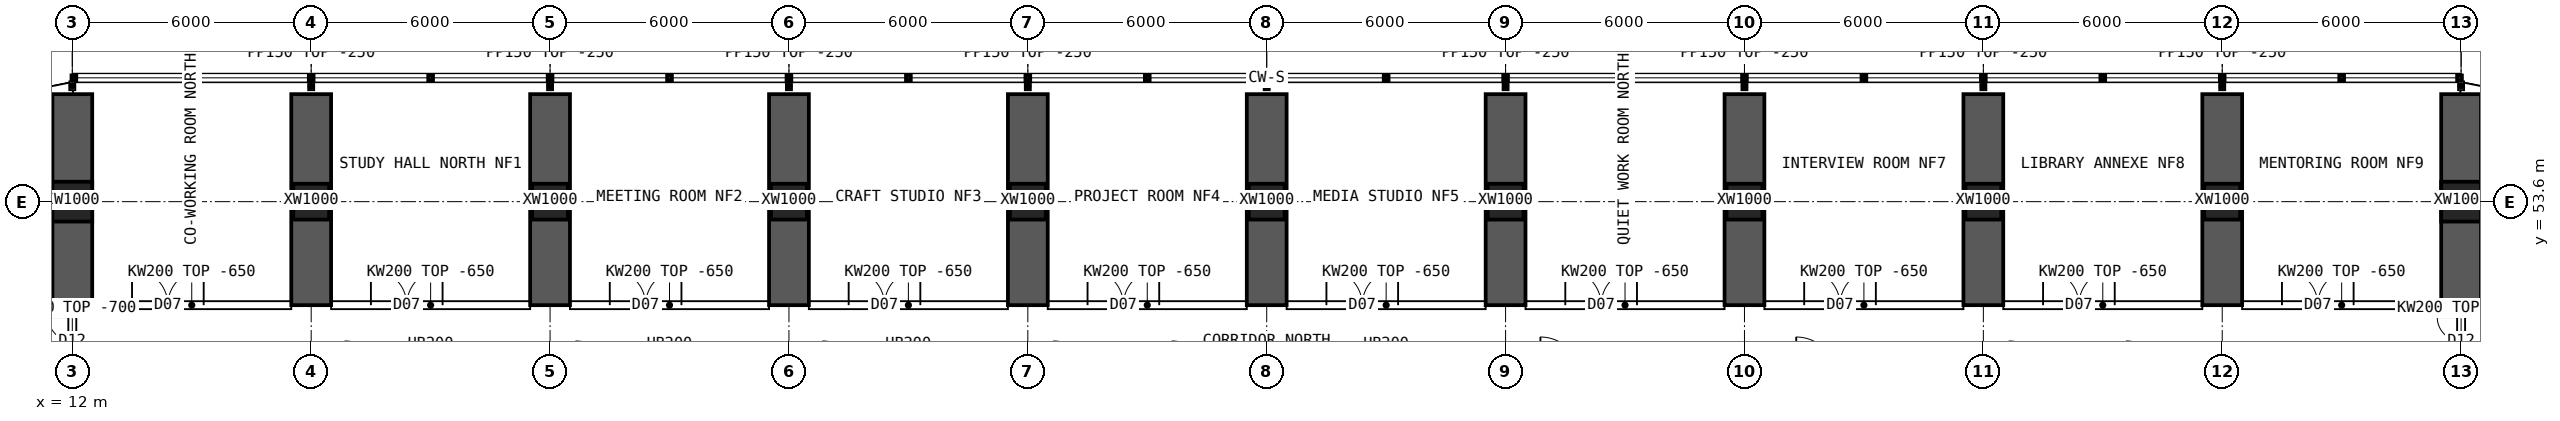
"""IFC4 building model, lengths in metres.
Left out: names, types, materials, properties, quantities, classifications, styles, units other than length and angle.
Written with IfcOpenShell. Run it as: python <this file> out.ifc"""

import sys

from ifc_helpers import new_model, si_unit, direction, frame, frame_2d, origin, origin_2d, place, context, subcontext, project, spatial, polyline, rectangle, hollow_rectangle, outline, extrude, element, fill, save


model = new_model("IFC4")
c1 = context("Model", 3, precision=1e-05, world=origin(), true_north=direction((0.0, 1.0)))
c2 = subcontext(c1, "Body", "Model", "MODEL_VIEW")
j1 = project(units=[si_unit("LENGTHUNIT", "METRE"), si_unit("PLANEANGLEUNIT", "RADIAN")], contexts=[c1])
p1 = place(None, origin())
s1 = spatial("IfcSite", under=j1, at=p1, CompositionType="ELEMENT")
p2 = place(p1, origin())
s2 = spatial("IfcBuilding", under=s1, at=p2, CompositionType="ELEMENT")
p3 = place(p2, frame((0.0, 0.0, 16.0)))
s3 = spatial("IfcBuildingStorey", under=s2, at=p3, CompositionType="ELEMENT", Elevation=16.0)
p4 = place(p3, frame((12.0, 53.6, 0.0), z_axis=(0.0, 0.0, 1.0), x_axis=(1.0, 0.0, 0.0)))
e1 = element("IfcColumn", 1, at=p4, inside=s3, PredefinedType="COLUMN", context=c2, shape_type="SweptSolid", body=[
    extrude(hollow_rectangle(XDim=1.0, YDim=1.0, WallThickness=0.1, at=origin_2d()), origin(), (0.0, 0.0, 1.0), 4.2),
])
for number, where, z_axis, x_axis in (
    (2, (18.0, 53.6, 0.0), (0.0, 0.0, 1.0), (1.0, 0.0, 0.0)),
    (3, (24.0, 53.6, 0.0), (0.0, 0.0, 1.0), (1.0, 0.0, 0.0)),
    (4, (30.0, 53.6, 0.0), (0.0, 0.0, 1.0), (1.0, 0.0, 0.0)),
    (5, (36.0, 53.6, 0.0), (0.0, 0.0, 1.0), (1.0, 0.0, 0.0)),
    (6, (42.0, 53.6, 0.0), (0.0, 0.0, 1.0), (1.0, 0.0, 0.0)),
    (7, (48.0, 53.6, 0.0), (0.0, 0.0, 1.0), (1.0, 0.0, 0.0)),
    (8, (54.0, 53.6, 0.0), (0.0, 0.0, 1.0), (1.0, 0.0, 0.0)),
    (9, (60.0, 53.6, 0.0), (0.0, 0.0, 1.0), (1.0, 0.0, 0.0)),
    (10, (66.0, 53.6, 0.0), (0.0, 0.0, 1.0), (1.0, 0.0, 0.0)),
):
    element("IfcColumn", number, at=place(p3, frame(where, z_axis=z_axis, x_axis=x_axis)), inside=s3, PredefinedType="COLUMN", context=c2, shape_type="SweptSolid", body=[
        extrude(hollow_rectangle(XDim=0.9, YDim=0.9, WallThickness=0.09, at=origin_2d()), origin(), (0.0, 0.0, 1.0), 4.2),
    ])
p5 = place(p3, frame((72.0, 53.6, 0.0), z_axis=(0.0, 0.0, 1.0), x_axis=(1.0, 0.0, 0.0)))
e11 = element("IfcColumn", 11, at=p5, inside=s3, PredefinedType="COLUMN", context=c2, shape_type="SweptSolid", body=[
    extrude(hollow_rectangle(XDim=1.0, YDim=1.0, WallThickness=0.1, at=origin_2d()), origin(), (0.0, 0.0, 1.0), 4.2),
])
for number, where, z_axis, x_axis in (
    (12, (12.0, 51.0, 0.0), (0.0, 0.0, 1.0), (0.0, 1.0, 0.0)),
    (13, (18.0, 51.0, 0.0), (0.0, 0.0, 1.0), (0.0, 1.0, 0.0)),
    (14, (24.0, 51.0, 0.0), (0.0, 0.0, 1.0), (0.0, 1.0, 0.0)),
    (15, (30.0, 51.0, 0.0), (0.0, 0.0, 1.0), (0.0, 1.0, 0.0)),
    (16, (36.0, 51.0, 0.0), (0.0, 0.0, 1.0), (0.0, 1.0, 0.0)),
    (17, (42.0, 51.0, 0.0), (0.0, 0.0, 1.0), (0.0, 1.0, 0.0)),
    (18, (48.0, 51.0, 0.0), (0.0, 0.0, 1.0), (0.0, 1.0, 0.0)),
    (19, (54.0, 51.0, 0.0), (0.0, 0.0, 1.0), (0.0, 1.0, 0.0)),
    (20, (60.0, 51.0, 0.0), (0.0, 0.0, 1.0), (0.0, 1.0, 0.0)),
    (21, (66.0, 51.0, 0.0), (0.0, 0.0, 1.0), (0.0, 1.0, 0.0)),
    (22, (72.0, 51.0, 0.0), (0.0, 0.0, 1.0), (0.0, 1.0, 0.0)),
):
    element("IfcWall", number, at=place(p3, frame(where, z_axis=z_axis, x_axis=x_axis)), inside=s3, PredefinedType="SHEAR", context=c2, shape_type="SweptSolid", body=[
        extrude(rectangle(XDim=5.3, YDim=1.0, at=frame_2d((2.65, 0.0))), origin(), (0.0, 0.0, 1.0), 4.2),
    ])
p6 = place(p3, frame((75.157, 55.822, 0.0), z_axis=(0.0, 0.0, 1.0), x_axis=(-0.980787251524, 0.195080412259, 0.0)))
e23 = element("IfcWall", 23, at=p6, inside=s3, PredefinedType="SOLIDWALL", context=c2, shape_type="SweptSolid", body=[
    extrude(outline(polyline([(-0.03, -0.15), (3.249, -0.15), (3.189, 0.15), (0.03, 0.15), (-0.03, -0.15)])), origin(), (0.0, 0.0, 1.0), 3.95),
])
p7 = place(p6, frame((0.909, 0.0, 0.9)))
e24 = element("IfcOpeningElement", 24, at=p7, cuts=e23, PredefinedType="OPENING", context=c2, shape_type="SweptSolid", body=[
    extrude(rectangle(XDim=1.4, YDim=1.8, at=frame_2d((0.7, 0.9))), frame((0.0, 0.16, 0.0), z_axis=(0.0, -1.0, 0.0), x_axis=(1.0, 0.0, 0.0)), (0.0, 0.0, 1.0), 0.32),
])
p8 = place(p3, frame((12.0, 56.45, 0.0), z_axis=(0.0, 0.0, 1.0), x_axis=(-0.980787251524, -0.195080412259, 0.0)))
e25 = element("IfcWall", 25, at=p8, inside=s3, PredefinedType="SOLIDWALL", context=c2, shape_type="SweptSolid", body=[
    extrude(outline(polyline([(-0.03, -0.15), (3.249, -0.15), (3.189, 0.15), (0.03, 0.15), (-0.03, -0.15)])), origin(), (0.0, 0.0, 1.0), 3.95),
])
p9 = place(p8, frame((0.909, 0.0, 0.9)))
e26 = element("IfcOpeningElement", 26, at=p9, cuts=e25, PredefinedType="OPENING", context=c2, shape_type="SweptSolid", body=[
    extrude(rectangle(XDim=1.4, YDim=1.8, at=frame_2d((0.7, 0.9))), frame((0.0, 0.16, 0.0), z_axis=(0.0, -1.0, 0.0), x_axis=(1.0, 0.0, 0.0)), (0.0, 0.0, 1.0), 0.32),
])
p10 = place(p3, frame((12.5, 51.0, 0.0), z_axis=(0.0, 0.0, 1.0), x_axis=(1.0, 0.0, 0.0)))
e27 = element("IfcWall", 27, at=p10, inside=s3, PredefinedType="SOLIDWALL", context=c2, shape_type="SweptSolid", body=[
    extrude(outline(polyline([(0.0, 0.0), (5.0, 0.0), (5.0, 3.55), (0.0, 3.55), (0.0, 0.0)])), frame((0.0, 0.1, 0.0), z_axis=(0.0, -1.0, 0.0), x_axis=(1.0, 0.0, 0.0)), (0.0, 0.0, 1.0), 0.2),
])
p11 = place(p10, frame((1.0, 0.0, 0.0)))
e28 = element("IfcOpeningElement", 28, at=p11, cuts=e27, PredefinedType="OPENING", context=c2, shape_type="SweptSolid", body=[
    extrude(rectangle(XDim=1.8, YDim=2.1, at=frame_2d((0.9, 1.05))), frame((0.0, 0.11, 0.0), z_axis=(0.0, -1.0, 0.0), x_axis=(1.0, 0.0, 0.0)), (0.0, 0.0, 1.0), 0.22),
])
p12 = place(p3, frame((18.5, 51.0, 0.0), z_axis=(0.0, 0.0, 1.0), x_axis=(1.0, 0.0, 0.0)))
e29 = element("IfcWall", 29, at=p12, inside=s3, PredefinedType="SOLIDWALL", context=c2, shape_type="SweptSolid", body=[
    extrude(outline(polyline([(0.0, 0.0), (5.0, 0.0), (5.0, 3.55), (0.0, 3.55), (0.0, 0.0)])), frame((0.0, 0.1, 0.0), z_axis=(0.0, -1.0, 0.0), x_axis=(1.0, 0.0, 0.0)), (0.0, 0.0, 1.0), 0.2),
])
p13 = place(p12, frame((1.0, 0.0, 0.0)))
e30 = element("IfcOpeningElement", 30, at=p13, cuts=e29, PredefinedType="OPENING", context=c2, shape_type="SweptSolid", body=[
    extrude(rectangle(XDim=1.8, YDim=2.1, at=frame_2d((0.9, 1.05))), frame((0.0, 0.11, 0.0), z_axis=(0.0, -1.0, 0.0), x_axis=(1.0, 0.0, 0.0)), (0.0, 0.0, 1.0), 0.22),
])
p14 = place(p3, frame((24.5, 51.0, 0.0), z_axis=(0.0, 0.0, 1.0), x_axis=(1.0, 0.0, 0.0)))
e31 = element("IfcWall", 31, at=p14, inside=s3, PredefinedType="SOLIDWALL", context=c2, shape_type="SweptSolid", body=[
    extrude(outline(polyline([(0.0, 0.0), (5.0, 0.0), (5.0, 3.55), (0.0, 3.55), (0.0, 0.0)])), frame((0.0, 0.1, 0.0), z_axis=(0.0, -1.0, 0.0), x_axis=(1.0, 0.0, 0.0)), (0.0, 0.0, 1.0), 0.2),
])
p15 = place(p14, frame((1.0, 0.0, 0.0)))
e32 = element("IfcOpeningElement", 32, at=p15, cuts=e31, PredefinedType="OPENING", context=c2, shape_type="SweptSolid", body=[
    extrude(rectangle(XDim=1.8, YDim=2.1, at=frame_2d((0.9, 1.05))), frame((0.0, 0.11, 0.0), z_axis=(0.0, -1.0, 0.0), x_axis=(1.0, 0.0, 0.0)), (0.0, 0.0, 1.0), 0.22),
])
p16 = place(p3, frame((30.5, 51.0, 0.0), z_axis=(0.0, 0.0, 1.0), x_axis=(1.0, 0.0, 0.0)))
e33 = element("IfcWall", 33, at=p16, inside=s3, PredefinedType="SOLIDWALL", context=c2, shape_type="SweptSolid", body=[
    extrude(outline(polyline([(0.0, 0.0), (5.0, 0.0), (5.0, 3.55), (0.0, 3.55), (0.0, 0.0)])), frame((0.0, 0.1, 0.0), z_axis=(0.0, -1.0, 0.0), x_axis=(1.0, 0.0, 0.0)), (0.0, 0.0, 1.0), 0.2),
])
p17 = place(p16, frame((1.0, 0.0, 0.0)))
e34 = element("IfcOpeningElement", 34, at=p17, cuts=e33, PredefinedType="OPENING", context=c2, shape_type="SweptSolid", body=[
    extrude(rectangle(XDim=1.8, YDim=2.1, at=frame_2d((0.9, 1.05))), frame((0.0, 0.11, 0.0), z_axis=(0.0, -1.0, 0.0), x_axis=(1.0, 0.0, 0.0)), (0.0, 0.0, 1.0), 0.22),
])
p18 = place(p3, frame((36.5, 51.0, 0.0), z_axis=(0.0, 0.0, 1.0), x_axis=(1.0, 0.0, 0.0)))
e35 = element("IfcWall", 35, at=p18, inside=s3, PredefinedType="SOLIDWALL", context=c2, shape_type="SweptSolid", body=[
    extrude(outline(polyline([(0.0, 0.0), (5.0, 0.0), (5.0, 3.55), (0.0, 3.55), (0.0, 0.0)])), frame((0.0, 0.1, 0.0), z_axis=(0.0, -1.0, 0.0), x_axis=(1.0, 0.0, 0.0)), (0.0, 0.0, 1.0), 0.2),
])
p19 = place(p18, frame((1.0, 0.0, 0.0)))
e36 = element("IfcOpeningElement", 36, at=p19, cuts=e35, PredefinedType="OPENING", context=c2, shape_type="SweptSolid", body=[
    extrude(rectangle(XDim=1.8, YDim=2.1, at=frame_2d((0.9, 1.05))), frame((0.0, 0.11, 0.0), z_axis=(0.0, -1.0, 0.0), x_axis=(1.0, 0.0, 0.0)), (0.0, 0.0, 1.0), 0.22),
])
p20 = place(p3, frame((42.5, 51.0, 0.0), z_axis=(0.0, 0.0, 1.0), x_axis=(1.0, 0.0, 0.0)))
e37 = element("IfcWall", 37, at=p20, inside=s3, PredefinedType="SOLIDWALL", context=c2, shape_type="SweptSolid", body=[
    extrude(outline(polyline([(0.0, 0.0), (5.0, 0.0), (5.0, 3.55), (0.0, 3.55), (0.0, 0.0)])), frame((0.0, 0.1, 0.0), z_axis=(0.0, -1.0, 0.0), x_axis=(1.0, 0.0, 0.0)), (0.0, 0.0, 1.0), 0.2),
])
p21 = place(p20, frame((1.0, 0.0, 0.0)))
e38 = element("IfcOpeningElement", 38, at=p21, cuts=e37, PredefinedType="OPENING", context=c2, shape_type="SweptSolid", body=[
    extrude(rectangle(XDim=1.8, YDim=2.1, at=frame_2d((0.9, 1.05))), frame((0.0, 0.11, 0.0), z_axis=(0.0, -1.0, 0.0), x_axis=(1.0, 0.0, 0.0)), (0.0, 0.0, 1.0), 0.22),
])
p22 = place(p3, frame((48.5, 51.0, 0.0), z_axis=(0.0, 0.0, 1.0), x_axis=(1.0, 0.0, 0.0)))
e39 = element("IfcWall", 39, at=p22, inside=s3, PredefinedType="SOLIDWALL", context=c2, shape_type="SweptSolid", body=[
    extrude(outline(polyline([(0.0, 0.0), (5.0, 0.0), (5.0, 3.55), (0.0, 3.55), (0.0, 0.0)])), frame((0.0, 0.1, 0.0), z_axis=(0.0, -1.0, 0.0), x_axis=(1.0, 0.0, 0.0)), (0.0, 0.0, 1.0), 0.2),
])
p23 = place(p22, frame((1.0, 0.0, 0.0)))
e40 = element("IfcOpeningElement", 40, at=p23, cuts=e39, PredefinedType="OPENING", context=c2, shape_type="SweptSolid", body=[
    extrude(rectangle(XDim=1.8, YDim=2.1, at=frame_2d((0.9, 1.05))), frame((0.0, 0.11, 0.0), z_axis=(0.0, -1.0, 0.0), x_axis=(1.0, 0.0, 0.0)), (0.0, 0.0, 1.0), 0.22),
])
p24 = place(p3, frame((54.5, 51.0, 0.0), z_axis=(0.0, 0.0, 1.0), x_axis=(1.0, 0.0, 0.0)))
e41 = element("IfcWall", 41, at=p24, inside=s3, PredefinedType="SOLIDWALL", context=c2, shape_type="SweptSolid", body=[
    extrude(outline(polyline([(0.0, 0.0), (5.0, 0.0), (5.0, 3.55), (0.0, 3.55), (0.0, 0.0)])), frame((0.0, 0.1, 0.0), z_axis=(0.0, -1.0, 0.0), x_axis=(1.0, 0.0, 0.0)), (0.0, 0.0, 1.0), 0.2),
])
p25 = place(p24, frame((1.0, 0.0, 0.0)))
e42 = element("IfcOpeningElement", 42, at=p25, cuts=e41, PredefinedType="OPENING", context=c2, shape_type="SweptSolid", body=[
    extrude(rectangle(XDim=1.8, YDim=2.1, at=frame_2d((0.9, 1.05))), frame((0.0, 0.11, 0.0), z_axis=(0.0, -1.0, 0.0), x_axis=(1.0, 0.0, 0.0)), (0.0, 0.0, 1.0), 0.22),
])
p26 = place(p3, frame((60.5, 51.0, 0.0), z_axis=(0.0, 0.0, 1.0), x_axis=(1.0, 0.0, 0.0)))
e43 = element("IfcWall", 43, at=p26, inside=s3, PredefinedType="SOLIDWALL", context=c2, shape_type="SweptSolid", body=[
    extrude(outline(polyline([(0.0, 0.0), (5.0, 0.0), (5.0, 3.55), (0.0, 3.55), (0.0, 0.0)])), frame((0.0, 0.1, 0.0), z_axis=(0.0, -1.0, 0.0), x_axis=(1.0, 0.0, 0.0)), (0.0, 0.0, 1.0), 0.2),
])
p27 = place(p26, frame((1.0, 0.0, 0.0)))
e44 = element("IfcOpeningElement", 44, at=p27, cuts=e43, PredefinedType="OPENING", context=c2, shape_type="SweptSolid", body=[
    extrude(rectangle(XDim=1.8, YDim=2.1, at=frame_2d((0.9, 1.05))), frame((0.0, 0.11, 0.0), z_axis=(0.0, -1.0, 0.0), x_axis=(1.0, 0.0, 0.0)), (0.0, 0.0, 1.0), 0.22),
])
p28 = place(p3, frame((66.5, 51.0, 0.0), z_axis=(0.0, 0.0, 1.0), x_axis=(1.0, 0.0, 0.0)))
e45 = element("IfcWall", 45, at=p28, inside=s3, PredefinedType="SOLIDWALL", context=c2, shape_type="SweptSolid", body=[
    extrude(outline(polyline([(0.0, 0.0), (5.0, 0.0), (5.0, 3.55), (0.0, 3.55), (0.0, 0.0)])), frame((0.0, 0.1, 0.0), z_axis=(0.0, -1.0, 0.0), x_axis=(1.0, 0.0, 0.0)), (0.0, 0.0, 1.0), 0.2),
])
p29 = place(p28, frame((1.0, 0.0, 0.0)))
e46 = element("IfcOpeningElement", 46, at=p29, cuts=e45, PredefinedType="OPENING", context=c2, shape_type="SweptSolid", body=[
    extrude(rectangle(XDim=1.8, YDim=2.1, at=frame_2d((0.9, 1.05))), frame((0.0, 0.11, 0.0), z_axis=(0.0, -1.0, 0.0), x_axis=(1.0, 0.0, 0.0)), (0.0, 0.0, 1.0), 0.22),
])
p30 = place(p3, frame((12.0, 49.3, 0.0), z_axis=(0.0, 0.0, 1.0), x_axis=(0.0, 1.0, 0.0)))
e47 = element("IfcWall", 47, at=p30, inside=s3, PredefinedType="SOLIDWALL", context=c2, shape_type="SweptSolid", body=[
    extrude(outline(polyline([(0.0, 0.0), (1.6, 0.0), (1.6, 3.5), (0.0, 3.5), (0.0, 0.0)])), frame((0.0, 0.1, 0.0), z_axis=(0.0, -1.0, 0.0), x_axis=(1.0, 0.0, 0.0)), (0.0, 0.0, 1.0), 0.2),
])
p31 = place(p30, frame((0.2, 0.0, 0.0)))
e48 = element("IfcOpeningElement", 48, at=p31, cuts=e47, PredefinedType="OPENING", context=c2, shape_type="SweptSolid", body=[
    extrude(rectangle(XDim=1.2, YDim=2.1, at=frame_2d((0.6, 1.05))), frame((0.0, 0.11, 0.0), z_axis=(0.0, -1.0, 0.0), x_axis=(1.0, 0.0, 0.0)), (0.0, 0.0, 1.0), 0.22),
])
p32 = place(p3, frame((72.0, 49.3, 0.0), z_axis=(0.0, 0.0, 1.0), x_axis=(0.0, 1.0, 0.0)))
e49 = element("IfcWall", 49, at=p32, inside=s3, PredefinedType="SOLIDWALL", context=c2, shape_type="SweptSolid", body=[
    extrude(outline(polyline([(0.0, 0.0), (1.6, 0.0), (1.6, 3.5), (0.0, 3.5), (0.0, 0.0)])), frame((0.0, 0.1, 0.0), z_axis=(0.0, -1.0, 0.0), x_axis=(1.0, 0.0, 0.0)), (0.0, 0.0, 1.0), 0.2),
])
p33 = place(p32, frame((0.2, 0.0, 0.0)))
e50 = element("IfcOpeningElement", 50, at=p33, cuts=e49, PredefinedType="OPENING", context=c2, shape_type="SweptSolid", body=[
    extrude(rectangle(XDim=1.2, YDim=2.1, at=frame_2d((0.6, 1.05))), frame((0.0, 0.11, 0.0), z_axis=(0.0, -1.0, 0.0), x_axis=(1.0, 0.0, 0.0)), (0.0, 0.0, 1.0), 0.22),
])
p34 = place(p3, frame((12.0, 56.4, 0.0), z_axis=(0.0, 0.0, 1.0), x_axis=(0.0, 1.0, 0.0)))
e51 = element("IfcWall", 51, at=p34, inside=s3, PredefinedType="PARTITIONING", context=c2, shape_type="SweptSolid", body=[
    extrude(rectangle(XDim=0.22, YDim=0.15, at=frame_2d((0.11, 0.0))), origin(), (0.0, 0.0, 1.0), 3.95),
])
for number, where, z_axis, x_axis in (
    (52, (18.0, 56.4, 0.0), (0.0, 0.0, 1.0), (0.0, 1.0, 0.0)),
    (53, (24.0, 56.4, 0.0), (0.0, 0.0, 1.0), (0.0, 1.0, 0.0)),
    (54, (30.0, 56.4, 0.0), (0.0, 0.0, 1.0), (0.0, 1.0, 0.0)),
    (55, (36.0, 56.4, 0.0), (0.0, 0.0, 1.0), (0.0, 1.0, 0.0)),
    (56, (42.0, 56.4, 0.0), (0.0, 0.0, 1.0), (0.0, 1.0, 0.0)),
    (57, (48.0, 56.4, 0.0), (0.0, 0.0, 1.0), (0.0, 1.0, 0.0)),
    (58, (54.0, 56.4, 0.0), (0.0, 0.0, 1.0), (0.0, 1.0, 0.0)),
    (59, (60.0, 56.4, 0.0), (0.0, 0.0, 1.0), (0.0, 1.0, 0.0)),
    (60, (66.0, 56.4, 0.0), (0.0, 0.0, 1.0), (0.0, 1.0, 0.0)),
):
    element("IfcWall", number, at=place(p3, frame(where, z_axis=z_axis, x_axis=x_axis)), inside=s3, PredefinedType="PARTITIONING", context=c2, shape_type="SweptSolid", body=[
        extrude(rectangle(XDim=0.19, YDim=0.15, at=frame_2d((0.095, 0.0))), origin(), (0.0, 0.0, 1.0), 3.95),
    ])
p35 = place(p3, frame((72.0, 56.4, 0.0), z_axis=(0.0, 0.0, 1.0), x_axis=(0.0, 1.0, 0.0)))
e61 = element("IfcWall", 61, at=p35, inside=s3, PredefinedType="PARTITIONING", context=c2, shape_type="SweptSolid", body=[
    extrude(rectangle(XDim=0.22, YDim=0.15, at=frame_2d((0.11, 0.0))), origin(), (0.0, 0.0, 1.0), 3.95),
])
p36 = place(p11, origin())
e62 = element("IfcDoor", 62, at=p36, inside=s3, OperationType="DOUBLE_DOOR_SINGLE_SWING", PredefinedType="DOOR", context=c2, shape_type="SweptSolid", body=[
    extrude(rectangle(XDim=1.8, YDim=2.1, at=frame_2d((0.9, 1.05))), frame((0.0, 0.025, 0.0), z_axis=(0.0, -1.0, 0.0), x_axis=(1.0, 0.0, 0.0)), (0.0, 0.0, 1.0), 0.05),
])
fill(e28, e62)
p37 = place(p13, origin())
e63 = element("IfcDoor", 63, at=p37, inside=s3, OperationType="DOUBLE_DOOR_SINGLE_SWING", PredefinedType="DOOR", context=c2, shape_type="SweptSolid", body=[
    extrude(rectangle(XDim=1.8, YDim=2.1, at=frame_2d((0.9, 1.05))), frame((0.0, 0.025, 0.0), z_axis=(0.0, -1.0, 0.0), x_axis=(1.0, 0.0, 0.0)), (0.0, 0.0, 1.0), 0.05),
])
fill(e30, e63)
p38 = place(p15, origin())
e64 = element("IfcDoor", 64, at=p38, inside=s3, OperationType="DOUBLE_DOOR_SINGLE_SWING", PredefinedType="DOOR", context=c2, shape_type="SweptSolid", body=[
    extrude(rectangle(XDim=1.8, YDim=2.1, at=frame_2d((0.9, 1.05))), frame((0.0, 0.025, 0.0), z_axis=(0.0, -1.0, 0.0), x_axis=(1.0, 0.0, 0.0)), (0.0, 0.0, 1.0), 0.05),
])
fill(e32, e64)
p39 = place(p17, origin())
e65 = element("IfcDoor", 65, at=p39, inside=s3, OperationType="DOUBLE_DOOR_SINGLE_SWING", PredefinedType="DOOR", context=c2, shape_type="SweptSolid", body=[
    extrude(rectangle(XDim=1.8, YDim=2.1, at=frame_2d((0.9, 1.05))), frame((0.0, 0.025, 0.0), z_axis=(0.0, -1.0, 0.0), x_axis=(1.0, 0.0, 0.0)), (0.0, 0.0, 1.0), 0.05),
])
fill(e34, e65)
p40 = place(p19, origin())
e66 = element("IfcDoor", 66, at=p40, inside=s3, OperationType="DOUBLE_DOOR_SINGLE_SWING", PredefinedType="DOOR", context=c2, shape_type="SweptSolid", body=[
    extrude(rectangle(XDim=1.8, YDim=2.1, at=frame_2d((0.9, 1.05))), frame((0.0, 0.025, 0.0), z_axis=(0.0, -1.0, 0.0), x_axis=(1.0, 0.0, 0.0)), (0.0, 0.0, 1.0), 0.05),
])
fill(e36, e66)
p41 = place(p21, origin())
e67 = element("IfcDoor", 67, at=p41, inside=s3, OperationType="DOUBLE_DOOR_SINGLE_SWING", PredefinedType="DOOR", context=c2, shape_type="SweptSolid", body=[
    extrude(rectangle(XDim=1.8, YDim=2.1, at=frame_2d((0.9, 1.05))), frame((0.0, 0.025, 0.0), z_axis=(0.0, -1.0, 0.0), x_axis=(1.0, 0.0, 0.0)), (0.0, 0.0, 1.0), 0.05),
])
fill(e38, e67)
p42 = place(p23, origin())
e68 = element("IfcDoor", 68, at=p42, inside=s3, OperationType="DOUBLE_DOOR_SINGLE_SWING", PredefinedType="DOOR", context=c2, shape_type="SweptSolid", body=[
    extrude(rectangle(XDim=1.8, YDim=2.1, at=frame_2d((0.9, 1.05))), frame((0.0, 0.025, 0.0), z_axis=(0.0, -1.0, 0.0), x_axis=(1.0, 0.0, 0.0)), (0.0, 0.0, 1.0), 0.05),
])
fill(e40, e68)
p43 = place(p25, origin())
e69 = element("IfcDoor", 69, at=p43, inside=s3, OperationType="DOUBLE_DOOR_SINGLE_SWING", PredefinedType="DOOR", context=c2, shape_type="SweptSolid", body=[
    extrude(rectangle(XDim=1.8, YDim=2.1, at=frame_2d((0.9, 1.05))), frame((0.0, 0.025, 0.0), z_axis=(0.0, -1.0, 0.0), x_axis=(1.0, 0.0, 0.0)), (0.0, 0.0, 1.0), 0.05),
])
fill(e42, e69)
p44 = place(p27, origin())
e70 = element("IfcDoor", 70, at=p44, inside=s3, OperationType="DOUBLE_DOOR_SINGLE_SWING", PredefinedType="DOOR", context=c2, shape_type="SweptSolid", body=[
    extrude(rectangle(XDim=1.8, YDim=2.1, at=frame_2d((0.9, 1.05))), frame((0.0, 0.025, 0.0), z_axis=(0.0, -1.0, 0.0), x_axis=(1.0, 0.0, 0.0)), (0.0, 0.0, 1.0), 0.05),
])
fill(e44, e70)
p45 = place(p29, origin())
e71 = element("IfcDoor", 71, at=p45, inside=s3, OperationType="DOUBLE_DOOR_SINGLE_SWING", PredefinedType="DOOR", context=c2, shape_type="SweptSolid", body=[
    extrude(rectangle(XDim=1.8, YDim=2.1, at=frame_2d((0.9, 1.05))), frame((0.0, 0.025, 0.0), z_axis=(0.0, -1.0, 0.0), x_axis=(1.0, 0.0, 0.0)), (0.0, 0.0, 1.0), 0.05),
])
fill(e46, e71)
p46 = place(p31, origin())
e72 = element("IfcDoor", 72, at=p46, inside=s3, OperationType="DOUBLE_DOOR_SINGLE_SWING", PredefinedType="DOOR", context=c2, shape_type="SweptSolid", body=[
    extrude(rectangle(XDim=1.2, YDim=2.1, at=frame_2d((0.6, 1.05))), frame((0.0, 0.025, 0.0), z_axis=(0.0, -1.0, 0.0), x_axis=(1.0, 0.0, 0.0)), (0.0, 0.0, 1.0), 0.05),
])
fill(e48, e72)
p47 = place(p33, origin())
e73 = element("IfcDoor", 73, at=p47, inside=s3, OperationType="DOUBLE_DOOR_SINGLE_SWING", PredefinedType="DOOR", context=c2, shape_type="SweptSolid", body=[
    extrude(rectangle(XDim=1.2, YDim=2.1, at=frame_2d((0.6, 1.05))), frame((0.0, 0.025, 0.0), z_axis=(0.0, -1.0, 0.0), x_axis=(1.0, 0.0, 0.0)), (0.0, 0.0, 1.0), 0.05),
])
fill(e50, e73)
save(model, sys.argv[1])
